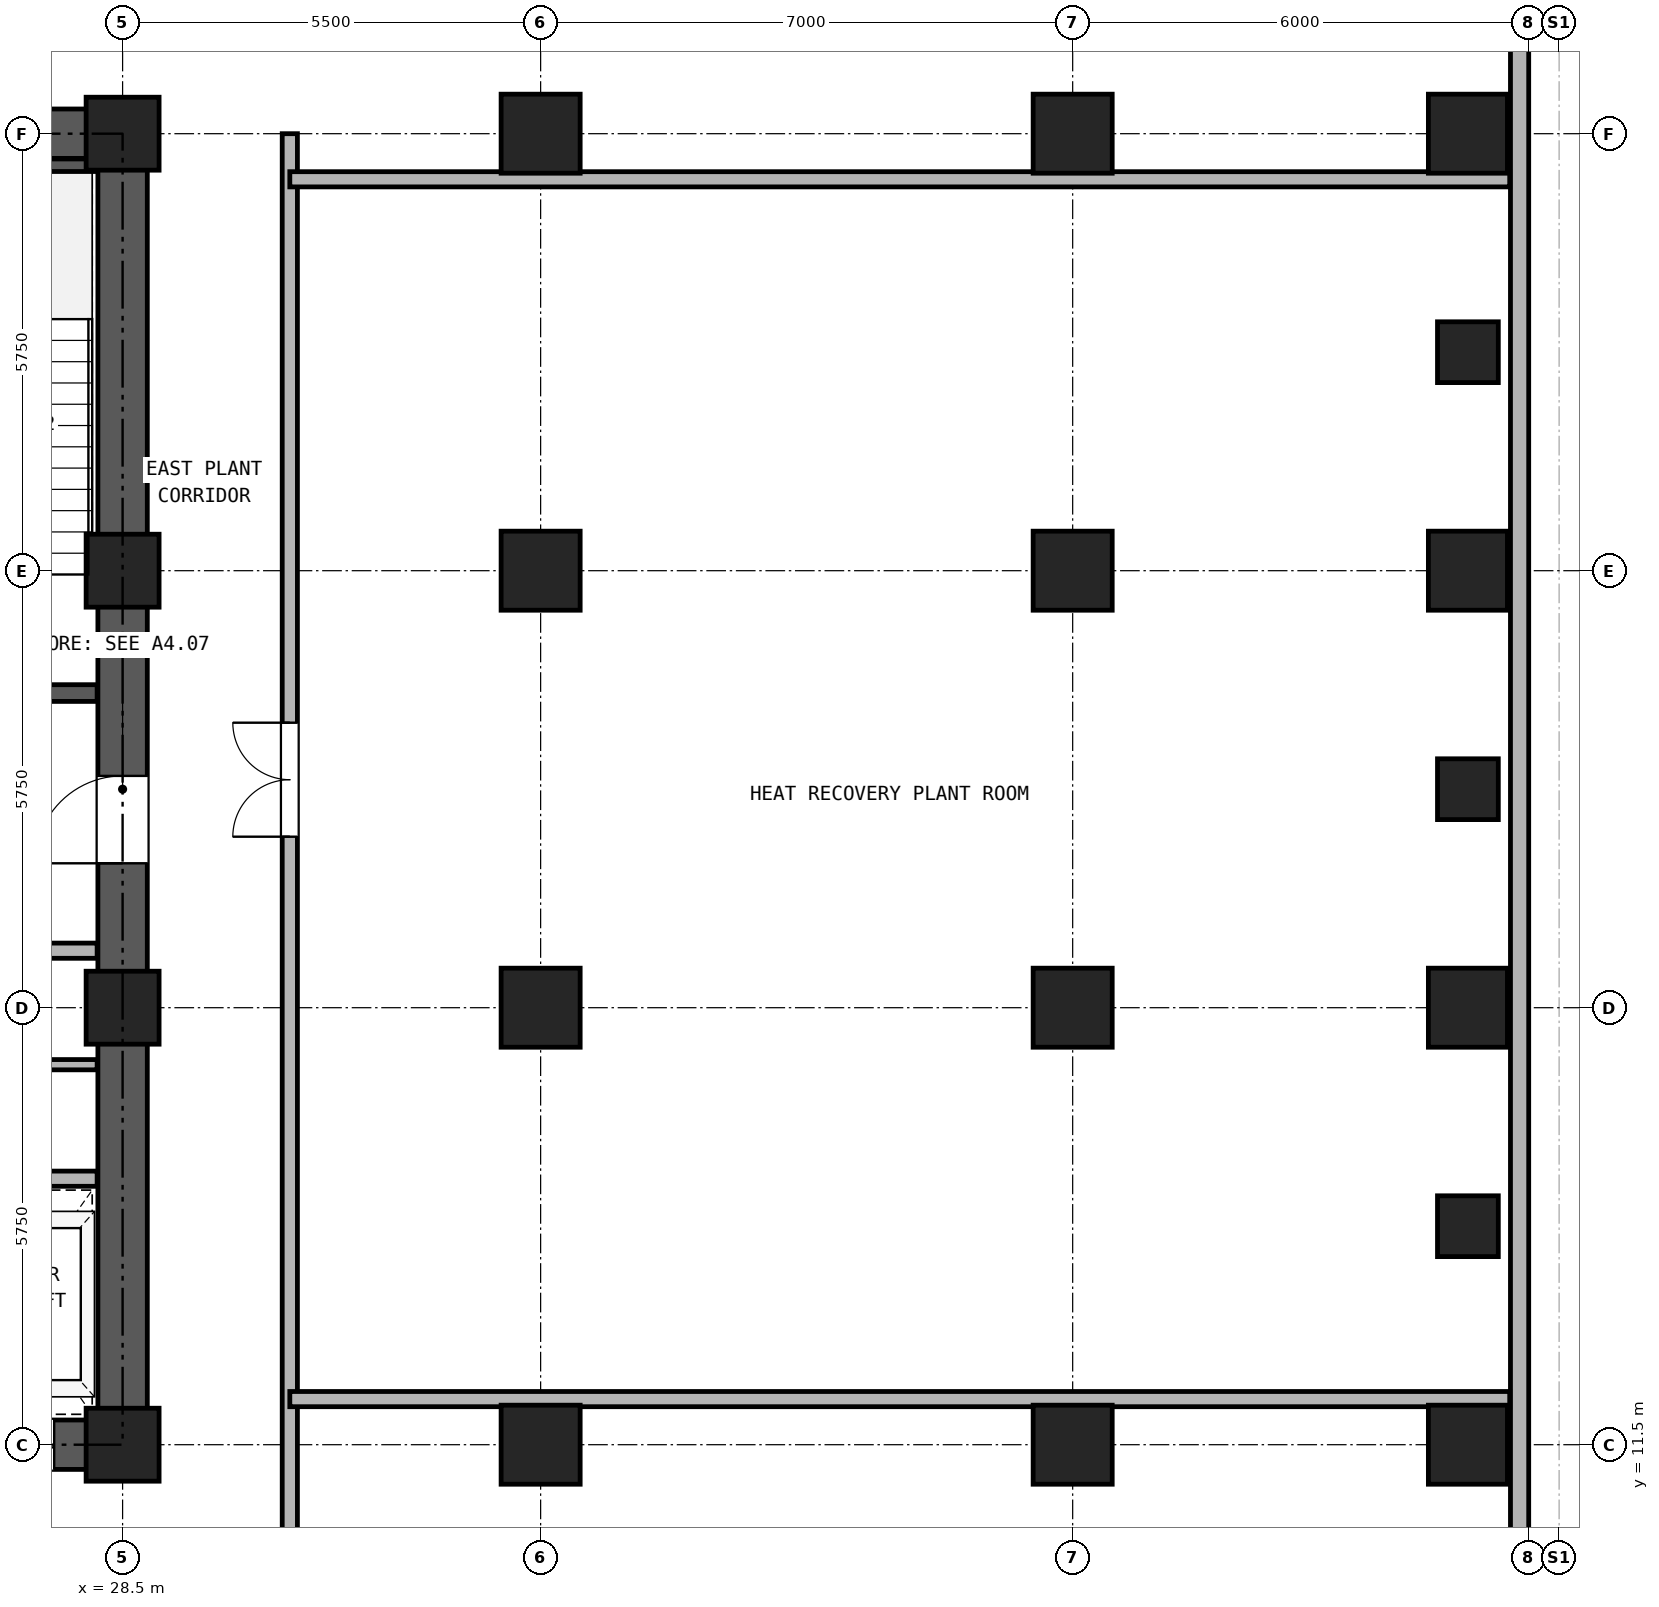
"""IFC4 building model, lengths in metres.
Left out: names, types, materials, properties, quantities, classifications, styles, units other than length and angle.
Written with IfcOpenShell. Run it as: python <this file> out.ifc"""

import sys

from ifc_helpers import new_model, si_unit, direction, frame, frame_2d, origin, origin_2d, place, context, subcontext, project, spatial, rectangle, hollow_rectangle, extrude, source, transform, mapped, element, fill, save


model = new_model("IFC4")
c1 = context("Model", 3, precision=1e-05, world=origin(), true_north=direction((0.0, 1.0)))
c2 = subcontext(c1, "Body", "Model", "MODEL_VIEW")
j1 = project(units=[si_unit("LENGTHUNIT", "METRE"), si_unit("PLANEANGLEUNIT", "RADIAN")], contexts=[c1])
p1 = place(None, origin())
s1 = spatial("IfcSite", under=j1, at=p1, CompositionType="ELEMENT")
p2 = place(p1, origin())
s2 = spatial("IfcBuilding", under=s1, at=p2, CompositionType="ELEMENT")
p3 = place(p2, frame((0.0, 0.0, 76.5)))
s3 = spatial("IfcBuildingStorey", under=s2, at=p3, CompositionType="ELEMENT", Elevation=76.5)
m1 = source(origin(), c2, "Body", "SweptSolid", [
    extrude(hollow_rectangle(XDim=1.04, YDim=1.04, WallThickness=0.065, at=origin_2d()), origin(), (0.0, 0.0, 1.0), 4.22),
])
for number, where, z_axis, x_axis in (
    (1, (46.2, 11.5, 0.0), (0.0, 0.0, 1.0), (1.0, 0.0, 0.0)),
    (2, (46.2, 17.25, 0.0), (0.0, 0.0, 1.0), (1.0, 0.0, 0.0)),
    (3, (46.2, 23.0, 0.0), (0.0, 0.0, 1.0), (1.0, 0.0, 0.0)),
    (4, (46.2, 28.75, 0.0), (0.0, 0.0, 1.0), (1.0, 0.0, 0.0)),
):
    element("IfcColumn", number, at=place(p3, frame(where, z_axis=z_axis, x_axis=x_axis)), inside=s3, PredefinedType="COLUMN", context=c2, shape_type="MappedRepresentation", body=[
        mapped(m1, transform((0.0, 0.0, 0.0), x_axis=(1.0, 0.0, 0.0), y_axis=(0.0, 1.0, 0.0), z_axis=(0.0, 0.0, 1.0), scale=1.0)),
    ])
m2 = source(origin(), c2, "Body", "SweptSolid", [
    extrude(hollow_rectangle(XDim=0.96, YDim=0.96, WallThickness=0.06, at=origin_2d()), origin(), (0.0, 0.0, 1.0), 4.22),
])
for number, where, z_axis, x_axis in (
    (5, (28.5, 11.5, 0.0), (0.0, 0.0, 1.0), (1.0, 0.0, 0.0)),
    (6, (28.5, 17.25, 0.0), (0.0, 0.0, 1.0), (1.0, 0.0, 0.0)),
    (7, (28.5, 23.0, 0.0), (0.0, 0.0, 1.0), (1.0, 0.0, 0.0)),
    (8, (28.5, 28.75, 0.0), (0.0, 0.0, 1.0), (1.0, 0.0, 0.0)),
):
    element("IfcColumn", number, at=place(p3, frame(where, z_axis=z_axis, x_axis=x_axis)), inside=s3, PredefinedType="COLUMN", context=c2, shape_type="MappedRepresentation", body=[
        mapped(m2, transform((0.0, 0.0, 0.0), x_axis=(1.0, 0.0, 0.0), y_axis=(0.0, 1.0, 0.0), z_axis=(0.0, 0.0, 1.0), scale=1.0)),
    ])
for number, where, z_axis, x_axis in (
    (9, (34.0, 11.5, 0.0), (0.0, 0.0, 1.0), (1.0, 0.0, 0.0)),
    (10, (34.0, 17.25, 0.0), (0.0, 0.0, 1.0), (1.0, 0.0, 0.0)),
    (11, (34.0, 23.0, 0.0), (0.0, 0.0, 1.0), (1.0, 0.0, 0.0)),
    (12, (34.0, 28.75, 0.0), (0.0, 0.0, 1.0), (1.0, 0.0, 0.0)),
    (13, (41.0, 11.5, 0.0), (0.0, 0.0, 1.0), (1.0, 0.0, 0.0)),
    (14, (41.0, 17.25, 0.0), (0.0, 0.0, 1.0), (1.0, 0.0, 0.0)),
    (15, (41.0, 23.0, 0.0), (0.0, 0.0, 1.0), (1.0, 0.0, 0.0)),
    (16, (41.0, 28.75, 0.0), (0.0, 0.0, 1.0), (1.0, 0.0, 0.0)),
):
    element("IfcColumn", number, at=place(p3, frame(where, z_axis=z_axis, x_axis=x_axis)), inside=s3, PredefinedType="COLUMN", context=c2, shape_type="MappedRepresentation", body=[
        mapped(m1, transform((0.0, 0.0, 0.0), x_axis=(1.0, 0.0, 0.0), y_axis=(0.0, 1.0, 0.0), z_axis=(0.0, 0.0, 1.0), scale=1.0)),
    ])
m3 = source(origin(), c2, "Body", "SweptSolid", [
    extrude(hollow_rectangle(XDim=0.8, YDim=0.8, WallThickness=0.045, at=origin_2d()), origin(), (0.0, 0.0, 1.0), 4.22),
])
for number, where, z_axis, x_axis in (
    (17, (46.2, 14.375, 0.0), (0.0, 0.0, 1.0), (1.0, 0.0, 0.0)),
    (18, (46.2, 20.125, 0.0), (0.0, 0.0, 1.0), (1.0, 0.0, 0.0)),
    (19, (46.2, 25.875, 0.0), (0.0, 0.0, 1.0), (1.0, 0.0, 0.0)),
):
    element("IfcColumn", number, at=place(p3, frame(where, z_axis=z_axis, x_axis=x_axis)), inside=s3, PredefinedType="COLUMN", context=c2, shape_type="MappedRepresentation", body=[
        mapped(m3, transform((0.0, 0.0, 0.0), x_axis=(1.0, 0.0, 0.0), y_axis=(0.0, 1.0, 0.0), z_axis=(0.0, 0.0, 1.0), scale=1.0)),
    ])
p4 = place(p3, frame((46.88, 4.0, 0.0), z_axis=(0.0, 0.0, 1.0), x_axis=(0.0, 1.0, 0.0)))
e20 = element("IfcWall", 20, at=p4, inside=s3, PredefinedType="SOLIDWALL", context=c2, shape_type="SweptSolid", body=[
    extrude(rectangle(XDim=32.5, YDim=0.24, at=frame_2d((16.25, 0.0))), origin(), (0.0, 0.0, 1.0), 4.22),
])
p5 = place(p3, frame((18.175, 11.5, 0.0), z_axis=(0.0, 0.0, 1.0), x_axis=(1.0, 0.0, 0.0)))
e21 = element("IfcWall", 21, at=p5, inside=s3, PredefinedType="SHEAR", context=c2, shape_type="SweptSolid", body=[
    extrude(rectangle(XDim=10.65, YDim=0.65, at=frame_2d((5.325, 0.0))), origin(), (0.0, 0.0, 1.0), 4.22),
])
p6 = place(p5, frame((1.195, 0.0, 0.0)))
e22 = element("IfcOpeningElement", 22, at=p6, cuts=e21, PredefinedType="OPENING", context=c2, shape_type="SweptSolid", body=[
    extrude(rectangle(XDim=1.1, YDim=2.25, at=frame_2d((0.55, 1.125))), frame((0.0, 0.335, 0.0), z_axis=(0.0, -1.0, 0.0), x_axis=(1.0, 0.0, 0.0)), (0.0, 0.0, 1.0), 0.67),
])
p7 = place(p5, frame((3.495, 0.0, 0.0)))
e23 = element("IfcOpeningElement", 23, at=p7, cuts=e21, PredefinedType="OPENING", context=c2, shape_type="SweptSolid", body=[
    extrude(rectangle(XDim=1.1, YDim=2.25, at=frame_2d((0.55, 1.125))), frame((0.0, 0.335, 0.0), z_axis=(0.0, -1.0, 0.0), x_axis=(1.0, 0.0, 0.0)), (0.0, 0.0, 1.0), 0.67),
])
p8 = place(p5, frame((5.925, 0.0, 0.0)))
e24 = element("IfcOpeningElement", 24, at=p8, cuts=e21, PredefinedType="OPENING", context=c2, shape_type="SweptSolid", body=[
    extrude(rectangle(XDim=1.1, YDim=2.25, at=frame_2d((0.55, 1.125))), frame((0.0, 0.335, 0.0), z_axis=(0.0, -1.0, 0.0), x_axis=(1.0, 0.0, 0.0)), (0.0, 0.0, 1.0), 0.67),
])
p9 = place(p5, frame((8.325, 0.0, 0.0)))
e25 = element("IfcOpeningElement", 25, at=p9, cuts=e21, PredefinedType="OPENING", context=c2, shape_type="SweptSolid", body=[
    extrude(rectangle(XDim=1.1, YDim=2.25, at=frame_2d((0.55, 1.125))), frame((0.0, 0.335, 0.0), z_axis=(0.0, -1.0, 0.0), x_axis=(1.0, 0.0, 0.0)), (0.0, 0.0, 1.0), 0.67),
])
p10 = place(p3, frame((18.175, 28.75, 0.0), z_axis=(0.0, 0.0, 1.0), x_axis=(1.0, 0.0, 0.0)))
e26 = element("IfcWall", 26, at=p10, inside=s3, PredefinedType="SHEAR", context=c2, shape_type="SweptSolid", body=[
    extrude(rectangle(XDim=10.65, YDim=0.65, at=frame_2d((5.325, 0.0))), origin(), (0.0, 0.0, 1.0), 4.22),
])
p11 = place(p10, frame((4.205, 0.0, 0.0)))
e27 = element("IfcOpeningElement", 27, at=p11, cuts=e26, PredefinedType="OPENING", context=c2, shape_type="SweptSolid", body=[
    extrude(rectangle(XDim=0.9, YDim=2.05, at=frame_2d((0.45, 1.025))), frame((0.0, 0.335, 0.0), z_axis=(0.0, -1.0, 0.0), x_axis=(1.0, 0.0, 0.0)), (0.0, 0.0, 1.0), 0.67),
])
p12 = place(p10, frame((5.745, 0.0, 0.0)))
e28 = element("IfcOpeningElement", 28, at=p12, cuts=e26, PredefinedType="OPENING", context=c2, shape_type="SweptSolid", body=[
    extrude(rectangle(XDim=0.9, YDim=2.05, at=frame_2d((0.45, 1.025))), frame((0.0, 0.335, 0.0), z_axis=(0.0, -1.0, 0.0), x_axis=(1.0, 0.0, 0.0)), (0.0, 0.0, 1.0), 0.67),
])
p13 = place(p3, frame((28.5, 11.825, 0.0), z_axis=(0.0, 0.0, 1.0), x_axis=(0.0, 1.0, 0.0)))
e29 = element("IfcWall", 29, at=p13, inside=s3, PredefinedType="SHEAR", context=c2, shape_type="SweptSolid", body=[
    extrude(rectangle(XDim=16.6, YDim=0.65, at=frame_2d((8.3, 0.0))), origin(), (0.0, 0.0, 1.0), 4.22),
])
p14 = place(p13, frame((7.325, 0.0, 0.0)))
e30 = element("IfcOpeningElement", 30, at=p14, cuts=e29, PredefinedType="OPENING", context=c2, shape_type="SweptSolid", body=[
    extrude(rectangle(XDim=1.15, YDim=2.2, at=frame_2d((0.575, 1.1))), frame((0.0, 0.335, 0.0), z_axis=(0.0, -1.0, 0.0), x_axis=(1.0, 0.0, 0.0)), (0.0, 0.0, 1.0), 0.67),
])
p15 = place(p3, frame((25.13, 28.335, 0.0), z_axis=(0.0, 0.0, 1.0), x_axis=(1.0, 0.0, 0.0)))
e31 = element("IfcWall", 31, at=p15, inside=s3, PredefinedType="PARTITIONING", context=c2, shape_type="SweptSolid", body=[
    extrude(rectangle(XDim=3.035, YDim=0.165, at=frame_2d((1.518, 0.0))), origin(), (0.0, 0.0, 1.0), 4.22),
])
p16 = place(p3, frame((25.13, 21.39, 0.0), z_axis=(0.0, 0.0, 1.0), x_axis=(1.0, 0.0, 0.0)))
e32 = element("IfcWall", 32, at=p16, inside=s3, PredefinedType="SOLIDWALL", context=c2, shape_type="SweptSolid", body=[
    extrude(rectangle(XDim=3.035, YDim=0.22, at=frame_2d((1.518, 0.0))), origin(), (0.0, 0.0, 1.0), 4.22),
])
p17 = place(p16, frame((0.92, 0.0, 0.0)))
e33 = element("IfcOpeningElement", 33, at=p17, cuts=e32, PredefinedType="OPENING", context=c2, shape_type="SweptSolid", body=[
    extrude(rectangle(XDim=1.15, YDim=2.2, at=frame_2d((0.575, 1.1))), frame((0.0, 0.12, 0.0), z_axis=(0.0, -1.0, 0.0), x_axis=(1.0, 0.0, 0.0)), (0.0, 0.0, 1.0), 0.24),
])
p18 = place(p3, frame((18.835, 18.0, 0.0), z_axis=(0.0, 0.0, 1.0), x_axis=(1.0, 0.0, 0.0)))
e34 = element("IfcWall", 34, at=p18, inside=s3, PredefinedType="PARTITIONING", context=c2, shape_type="SweptSolid", body=[
    extrude(rectangle(XDim=9.33, YDim=0.2, at=frame_2d((4.665, 0.0))), origin(), (0.0, 0.0, 1.0), 4.22),
])
p19 = place(p18, frame((0.415, 0.0, 0.0)))
e35 = element("IfcOpeningElement", 35, at=p19, cuts=e34, PredefinedType="OPENING", context=c2, shape_type="SweptSolid", body=[
    extrude(rectangle(XDim=1.3, YDim=2.3, at=frame_2d((0.65, 1.15))), frame((0.0, 0.11, 0.0), z_axis=(0.0, -1.0, 0.0), x_axis=(1.0, 0.0, 0.0)), (0.0, 0.0, 1.0), 0.22),
])
p20 = place(p18, frame((2.515, 0.0, 0.0)))
e36 = element("IfcOpeningElement", 36, at=p20, cuts=e34, PredefinedType="OPENING", context=c2, shape_type="SweptSolid", body=[
    extrude(rectangle(XDim=1.3, YDim=2.3, at=frame_2d((0.65, 1.15))), frame((0.0, 0.11, 0.0), z_axis=(0.0, -1.0, 0.0), x_axis=(1.0, 0.0, 0.0)), (0.0, 0.0, 1.0), 0.22),
])
p21 = place(p18, frame((7.015, 0.0, 0.0)))
e37 = element("IfcOpeningElement", 37, at=p21, cuts=e34, PredefinedType="OPENING", context=c2, shape_type="SweptSolid", body=[
    extrude(rectangle(XDim=1.0, YDim=2.15, at=frame_2d((0.5, 1.075))), frame((0.0, 0.11, 0.0), z_axis=(0.0, -1.0, 0.0), x_axis=(1.0, 0.0, 0.0)), (0.0, 0.0, 1.0), 0.22),
])
p22 = place(p3, frame((18.835, 15.0, 0.0), z_axis=(0.0, 0.0, 1.0), x_axis=(1.0, 0.0, 0.0)))
e38 = element("IfcWall", 38, at=p22, inside=s3, PredefinedType="PARTITIONING", context=c2, shape_type="SweptSolid", body=[
    extrude(rectangle(XDim=9.33, YDim=0.2, at=frame_2d((4.665, 0.0))), origin(), (0.0, 0.0, 1.0), 4.22),
])
p23 = place(p3, frame((23.3, 16.5, 0.0), z_axis=(0.0, 0.0, 1.0), x_axis=(1.0, 0.0, 0.0)))
e39 = element("IfcWall", 39, at=p23, inside=s3, PredefinedType="PARTITIONING", context=c2, shape_type="SweptSolid", body=[
    extrude(rectangle(XDim=4.865, YDim=0.135, at=frame_2d((2.433, 0.0))), origin(), (0.0, 0.0, 1.0), 4.22),
])
p24 = place(p23, frame((2.55, 0.0, 0.0)))
e40 = element("IfcOpeningElement", 40, at=p24, cuts=e39, PredefinedType="OPENING", context=c2, shape_type="SweptSolid", body=[
    extrude(rectangle(XDim=0.9, YDim=2.05, at=frame_2d((0.45, 1.025))), frame((0.0, 0.077, 0.0), z_axis=(0.0, -1.0, 0.0), x_axis=(1.0, 0.0, 0.0)), (0.0, 0.0, 1.0), 0.155),
])
p25 = place(p3, frame((30.7, 8.9, 0.0), z_axis=(0.0, 0.0, 1.0), x_axis=(0.0, 1.0, 0.0)))
e41 = element("IfcWall", 41, at=p25, inside=s3, PredefinedType="PARTITIONING", context=c2, shape_type="SweptSolid", body=[
    extrude(rectangle(XDim=19.85, YDim=0.2, at=frame_2d((9.925, 0.0))), origin(), (0.0, 0.0, 1.0), 4.22),
])
p26 = place(p25, frame((10.6, 0.0, 0.0)))
e42 = element("IfcOpeningElement", 42, at=p26, cuts=e41, PredefinedType="OPENING", context=c2, shape_type="SweptSolid", body=[
    extrude(rectangle(XDim=1.5, YDim=2.25, at=frame_2d((0.75, 1.125))), frame((0.0, 0.11, 0.0), z_axis=(0.0, -1.0, 0.0), x_axis=(1.0, 0.0, 0.0)), (0.0, 0.0, 1.0), 0.22),
])
for number, where, z_axis, x_axis in (
    (43, (30.7, 12.1, 0.0), (0.0, 0.0, 1.0), (1.0, 0.0, 0.0)),
    (44, (30.7, 28.15, 0.0), (0.0, 0.0, 1.0), (1.0, 0.0, 0.0)),
):
    element("IfcWall", number, at=place(p3, frame(where, z_axis=z_axis, x_axis=x_axis)), inside=s3, PredefinedType="PARTITIONING", context=c2, shape_type="SweptSolid", body=[
        extrude(rectangle(XDim=16.05, YDim=0.2, at=frame_2d((8.025, 0.0))), origin(), (0.0, 0.0, 1.0), 4.22),
    ])
p27 = place(p14, origin())
e45 = element("IfcDoor", 45, at=p27, inside=s3, OperationType="SINGLE_SWING_LEFT", PredefinedType="DOOR", context=c2, shape_type="SweptSolid", body=[
    extrude(rectangle(XDim=1.15, YDim=2.2, at=frame_2d((0.575, 1.1))), frame((0.0, 0.025, 0.0), z_axis=(0.0, -1.0, 0.0), x_axis=(1.0, 0.0, 0.0)), (0.0, 0.0, 1.0), 0.05),
])
fill(e30, e45)
p28 = place(p9, frame((1.1, 0.0, 0.0), z_axis=(0.0, 0.0, 1.0), x_axis=(-1.0, 0.0, 0.0)))
e46 = element("IfcDoor", 46, at=p28, inside=s3, OperationType="DOUBLE_DOOR_SLIDING", PredefinedType="DOOR", context=c2, shape_type="SweptSolid", body=[
    extrude(rectangle(XDim=1.1, YDim=2.25, at=frame_2d((0.55, 1.125))), frame((0.0, 0.025, 0.0), z_axis=(0.0, -1.0, 0.0), x_axis=(1.0, 0.0, 0.0)), (0.0, 0.0, 1.0), 0.05),
])
fill(e25, e46)
p29 = place(p26, origin())
e47 = element("IfcDoor", 47, at=p29, inside=s3, OperationType="DOUBLE_DOOR_SINGLE_SWING", PredefinedType="DOOR", context=c2, shape_type="SweptSolid", body=[
    extrude(rectangle(XDim=1.5, YDim=2.25, at=frame_2d((0.75, 1.125))), frame((0.0, 0.025, 0.0), z_axis=(0.0, -1.0, 0.0), x_axis=(1.0, 0.0, 0.0)), (0.0, 0.0, 1.0), 0.05),
])
fill(e42, e47)
save(model, sys.argv[1])
